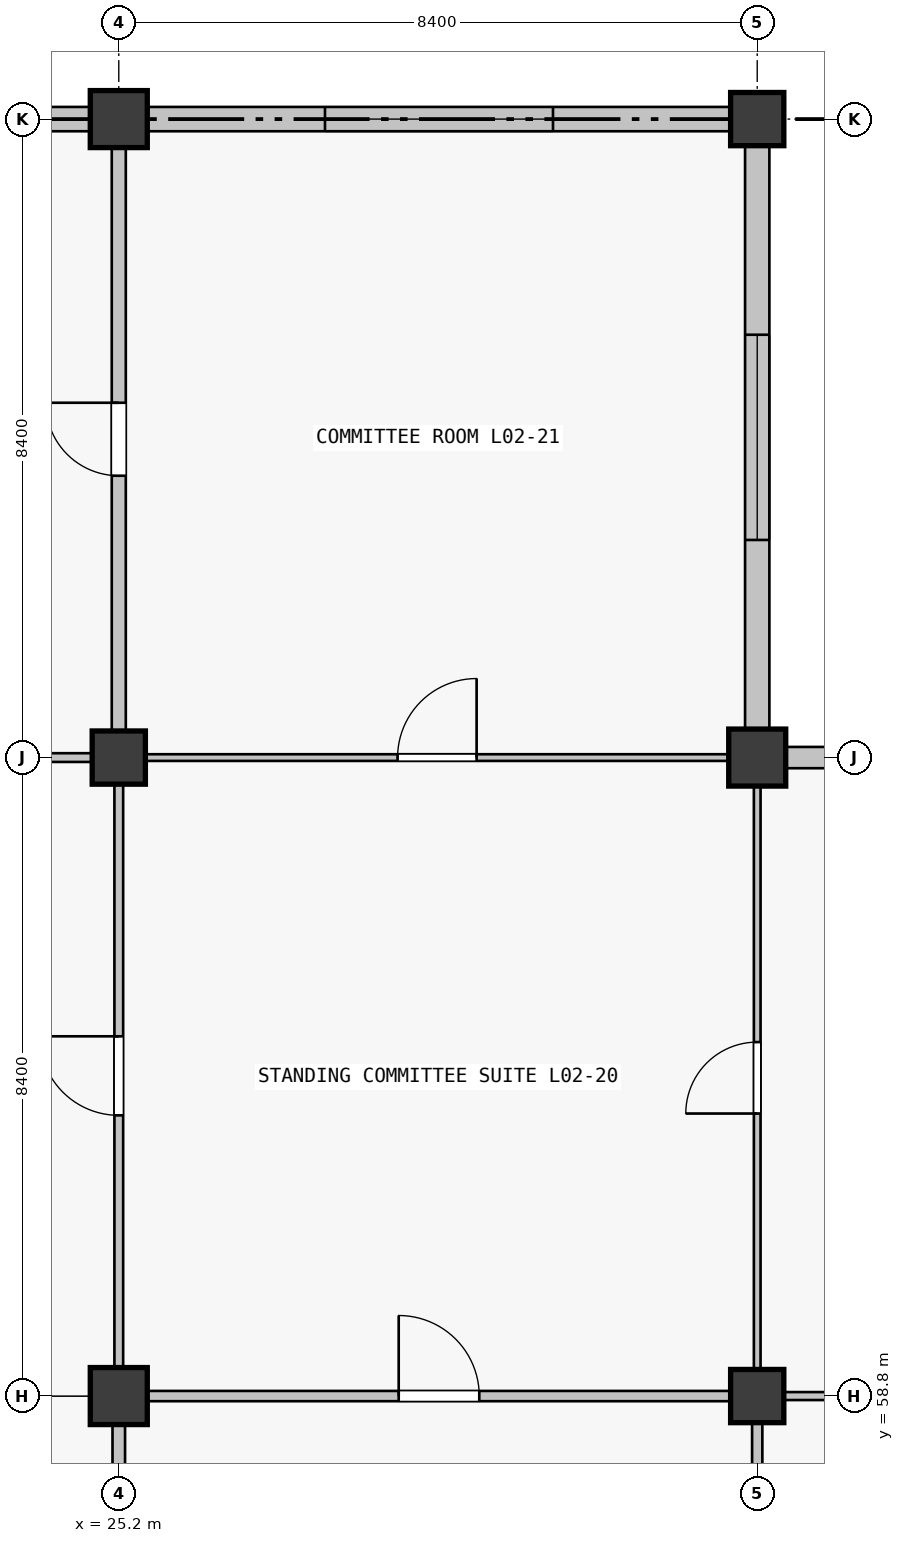
"""IFC4 building model, lengths in metres.
Left out: names, types, materials, properties, quantities, classifications, styles, units other than length and angle.
Written with IfcOpenShell. Run it as: python <this file> out.ifc"""

import sys

from ifc_helpers import new_model, si_unit, direction, frame, frame_2d, origin, origin_2d, place, context, subcontext, project, spatial, rectangle, extrude, element, fill, save


model = new_model("IFC4")
c1 = context("Model", 3, precision=1e-05, world=origin(), true_north=direction((0.0, 1.0)))
c2 = subcontext(c1, "Body", "Model", "MODEL_VIEW")
j1 = project(units=[si_unit("LENGTHUNIT", "METRE"), si_unit("PLANEANGLEUNIT", "RADIAN")], contexts=[c1])
p1 = place(None, origin())
s1 = spatial("IfcSite", under=j1, at=p1, CompositionType="ELEMENT")
p2 = place(p1, origin())
s2 = spatial("IfcBuilding", under=s1, at=p2, CompositionType="ELEMENT")
p3 = place(p2, frame((0.0, 0.0, 10.26)))
s3 = spatial("IfcBuildingStorey", under=s2, at=p3, CompositionType="ELEMENT", Elevation=10.26)
p4 = place(p3, frame((25.2, 58.8, 0.0), z_axis=(0.0, 0.0, 1.0), x_axis=(1.0, 0.0, 0.0)))
e1 = element("IfcColumn", 1, at=p4, inside=s3, PredefinedType="COLUMN", context=c2, shape_type="SweptSolid", body=[
    extrude(rectangle(XDim=0.75, YDim=0.75, at=origin_2d()), origin(), (0.0, 0.0, 1.0), 4.5),
])
p5 = place(p3, frame((25.2, 67.2, 0.0), z_axis=(0.0, 0.0, 1.0), x_axis=(1.0, 0.0, 0.0)))
e2 = element("IfcColumn", 2, at=p5, inside=s3, PredefinedType="COLUMN", context=c2, shape_type="SweptSolid", body=[
    extrude(rectangle(XDim=0.7, YDim=0.7, at=origin_2d()), origin(), (0.0, 0.0, 1.0), 4.5),
])
p6 = place(p3, frame((25.2, 75.6, 0.0), z_axis=(0.0, 0.0, 1.0), x_axis=(1.0, 0.0, 0.0)))
e3 = element("IfcColumn", 3, at=p6, inside=s3, PredefinedType="COLUMN", context=c2, shape_type="SweptSolid", body=[
    extrude(rectangle(XDim=0.75, YDim=0.75, at=origin_2d()), origin(), (0.0, 0.0, 1.0), 4.5),
])
p7 = place(p3, frame((33.6, 58.8, 0.0), z_axis=(0.0, 0.0, 1.0), x_axis=(1.0, 0.0, 0.0)))
e4 = element("IfcColumn", 4, at=p7, inside=s3, PredefinedType="COLUMN", context=c2, shape_type="SweptSolid", body=[
    extrude(rectangle(XDim=0.7, YDim=0.7, at=origin_2d()), origin(), (0.0, 0.0, 1.0), 4.5),
])
p8 = place(p3, frame((33.6, 67.2, 0.0), z_axis=(0.0, 0.0, 1.0), x_axis=(1.0, 0.0, 0.0)))
e5 = element("IfcColumn", 5, at=p8, inside=s3, PredefinedType="COLUMN", context=c2, shape_type="SweptSolid", body=[
    extrude(rectangle(XDim=0.75, YDim=0.75, at=origin_2d()), origin(), (0.0, 0.0, 1.0), 4.5),
])
p9 = place(p3, frame((33.6, 75.6, 0.0), z_axis=(0.0, 0.0, 1.0), x_axis=(1.0, 0.0, 0.0)))
e6 = element("IfcColumn", 6, at=p9, inside=s3, PredefinedType="COLUMN", context=c2, shape_type="SweptSolid", body=[
    extrude(rectangle(XDim=0.7, YDim=0.7, at=origin_2d()), origin(), (0.0, 0.0, 1.0), 4.5),
])
p10 = place(p3, frame((17.151, 75.6, 0.0), z_axis=(0.0, 0.0, 1.0), x_axis=(1.0, 0.0, 0.0)))
e7 = element("IfcWall", 7, at=p10, inside=s3, PredefinedType="SOLIDWALL", context=c2, shape_type="SweptSolid", body=[
    extrude(rectangle(XDim=7.673, YDim=0.32, at=frame_2d((3.836, 0.0))), origin(), (0.0, 0.0, 1.0), 3.54),
])
p11 = place(p10, frame((2.636, 0.0, 0.9)))
e8 = element("IfcOpeningElement", 8, at=p11, cuts=e7, PredefinedType="OPENING", context=c2, shape_type="SweptSolid", body=[
    extrude(rectangle(XDim=2.4, YDim=1.8, at=frame_2d((1.2, 0.9))), frame((0.0, 0.16, 0.0), z_axis=(0.0, -1.0, 0.0), x_axis=(1.0, 0.0, 0.0)), (0.0, 0.0, 1.0), 0.32),
])
p12 = place(p3, frame((25.576, 75.6, 0.0), z_axis=(0.0, 0.0, 1.0), x_axis=(1.0, 0.0, 0.0)))
e9 = element("IfcWall", 9, at=p12, inside=s3, PredefinedType="SOLIDWALL", context=c2, shape_type="SweptSolid", body=[
    extrude(rectangle(XDim=7.673, YDim=0.32, at=frame_2d((3.836, 0.0))), origin(), (0.0, 0.0, 1.0), 3.54),
])
p13 = place(p12, frame((2.337, 0.0, 0.9)))
e10 = element("IfcOpeningElement", 10, at=p13, cuts=e9, PredefinedType="OPENING", context=c2, shape_type="SweptSolid", body=[
    extrude(rectangle(XDim=3.0, YDim=1.2, at=frame_2d((1.5, 0.6))), frame((0.0, 0.16, 0.0), z_axis=(0.0, -1.0, 0.0), x_axis=(1.0, 0.0, 0.0)), (0.0, 0.0, 1.0), 0.32),
])
p14 = place(p3, frame((33.6, 75.249, 0.0), z_axis=(0.0, 0.0, 1.0), x_axis=(0.0, -1.0, 0.0)))
e11 = element("IfcWall", 11, at=p14, inside=s3, PredefinedType="SOLIDWALL", context=c2, shape_type="SweptSolid", body=[
    extrude(rectangle(XDim=7.673, YDim=0.32, at=frame_2d((3.836, 0.0))), origin(), (0.0, 0.0, 1.0), 3.54),
])
p15 = place(p14, frame((2.486, 0.0, 0.9)))
e12 = element("IfcOpeningElement", 12, at=p15, cuts=e11, PredefinedType="OPENING", context=c2, shape_type="SweptSolid", body=[
    extrude(rectangle(XDim=2.7, YDim=1.2, at=frame_2d((1.35, 0.6))), frame((0.0, 0.16, 0.0), z_axis=(0.0, -1.0, 0.0), x_axis=(1.0, 0.0, 0.0)), (0.0, 0.0, 1.0), 0.32),
])
p16 = place(p3, frame((33.976, 67.2, 0.0), z_axis=(0.0, 0.0, 1.0), x_axis=(1.0, 0.0, 0.0)))
e13 = element("IfcWall", 13, at=p16, inside=s3, PredefinedType="SOLIDWALL", context=c2, shape_type="SweptSolid", body=[
    extrude(rectangle(XDim=7.673, YDim=0.28, at=frame_2d((3.836, 0.0))), origin(), (0.0, 0.0, 1.0), 3.54),
])
p17 = place(p16, frame((2.937, 0.0, 0.9)))
e14 = element("IfcOpeningElement", 14, at=p17, cuts=e13, PredefinedType="OPENING", context=c2, shape_type="SweptSolid", body=[
    extrude(rectangle(XDim=1.8, YDim=1.35, at=frame_2d((0.9, 0.675))), frame((0.0, 0.14, 0.0), z_axis=(0.0, -1.0, 0.0), x_axis=(1.0, 0.0, 0.0)), (0.0, 0.0, 1.0), 0.28),
])
p18 = place(p3, frame((17.177, 67.2, 0.0), z_axis=(0.0, 0.0, 1.0), x_axis=(1.0, 0.0, 0.0)))
e15 = element("IfcWall", 15, at=p18, inside=s3, PredefinedType="PARTITIONING", context=c2, shape_type="SweptSolid", body=[
    extrude(rectangle(XDim=7.671, YDim=0.115, at=frame_2d((3.835, 0.0))), origin(), (0.0, 0.0, 1.0), 3.37),
])
p19 = place(p18, frame((3.316, 0.0, 0.0)))
e16 = element("IfcOpeningElement", 16, at=p19, cuts=e15, PredefinedType="OPENING", context=c2, shape_type="SweptSolid", body=[
    extrude(rectangle(XDim=1.04, YDim=2.2, at=frame_2d((0.52, 1.1))), frame((0.0, 0.058, 0.0), z_axis=(0.0, -1.0, 0.0), x_axis=(1.0, 0.0, 0.0)), (0.0, 0.0, 1.0), 0.115),
])
p20 = place(p3, frame((25.577, 58.8, 0.0), z_axis=(0.0, 0.0, 1.0), x_axis=(1.0, 0.0, 0.0)))
e17 = element("IfcWall", 17, at=p20, inside=s3, PredefinedType="PARTITIONING", context=c2, shape_type="SweptSolid", body=[
    extrude(rectangle(XDim=7.671, YDim=0.135, at=frame_2d((3.835, 0.0))), origin(), (0.0, 0.0, 1.0), 3.37),
])
p21 = place(p20, frame((3.306, 0.0, 0.0)))
e18 = element("IfcOpeningElement", 18, at=p21, cuts=e17, PredefinedType="OPENING", context=c2, shape_type="SweptSolid", body=[
    extrude(rectangle(XDim=1.06, YDim=2.25, at=frame_2d((0.53, 1.125))), frame((0.0, 0.067, 0.0), z_axis=(0.0, -1.0, 0.0), x_axis=(1.0, 0.0, 0.0)), (0.0, 0.0, 1.0), 0.135),
])
p22 = place(p3, frame((25.552, 67.2, 0.0), z_axis=(0.0, 0.0, 1.0), x_axis=(1.0, 0.0, 0.0)))
e19 = element("IfcWall", 19, at=p22, inside=s3, PredefinedType="PARTITIONING", context=c2, shape_type="SweptSolid", body=[
    extrude(rectangle(XDim=7.671, YDim=0.088, at=frame_2d((3.835, 0.0))), origin(), (0.0, 0.0, 1.0), 3.37),
])
p23 = place(p22, frame((3.316, 0.0, 0.0)))
e20 = element("IfcOpeningElement", 20, at=p23, cuts=e19, PredefinedType="OPENING", context=c2, shape_type="SweptSolid", body=[
    extrude(rectangle(XDim=1.04, YDim=2.2, at=frame_2d((0.52, 1.1))), frame((0.0, 0.044, 0.0), z_axis=(0.0, -1.0, 0.0), x_axis=(1.0, 0.0, 0.0)), (0.0, 0.0, 1.0), 0.088),
])
p24 = place(p3, frame((33.952, 58.8, 0.0), z_axis=(0.0, 0.0, 1.0), x_axis=(1.0, 0.0, 0.0)))
e21 = element("IfcWall", 21, at=p24, inside=s3, PredefinedType="PARTITIONING", context=c2, shape_type="SweptSolid", body=[
    extrude(rectangle(XDim=7.721, YDim=0.105, at=frame_2d((3.861, 0.0))), origin(), (0.0, 0.0, 1.0), 3.37),
])
p25 = place(p24, frame((3.351, 0.0, 0.0)))
e22 = element("IfcOpeningElement", 22, at=p25, cuts=e21, PredefinedType="OPENING", context=c2, shape_type="SweptSolid", body=[
    extrude(rectangle(XDim=1.02, YDim=2.2, at=frame_2d((0.51, 1.1))), frame((0.0, 0.052, 0.0), z_axis=(0.0, -1.0, 0.0), x_axis=(1.0, 0.0, 0.0)), (0.0, 0.0, 1.0), 0.105),
])
p26 = place(p3, frame((25.2, 50.752, 0.0), z_axis=(0.0, 0.0, 1.0), x_axis=(0.0, 1.0, 0.0)))
e23 = element("IfcWall", 23, at=p26, inside=s3, PredefinedType="PARTITIONING", context=c2, shape_type="SweptSolid", body=[
    extrude(rectangle(XDim=7.671, YDim=0.165, at=frame_2d((3.835, 0.0))), origin(), (0.0, 0.0, 1.0), 3.37),
])
p27 = place(p26, frame((3.306, 0.0, 0.0)))
e24 = element("IfcOpeningElement", 24, at=p27, cuts=e23, PredefinedType="OPENING", context=c2, shape_type="SweptSolid", body=[
    extrude(rectangle(XDim=1.06, YDim=2.25, at=frame_2d((0.53, 1.125))), frame((0.0, 0.083, 0.0), z_axis=(0.0, -1.0, 0.0), x_axis=(1.0, 0.0, 0.0)), (0.0, 0.0, 1.0), 0.165),
])
p28 = place(p3, frame((25.2, 59.177, 0.0), z_axis=(0.0, 0.0, 1.0), x_axis=(0.0, 1.0, 0.0)))
e25 = element("IfcWall", 25, at=p28, inside=s3, PredefinedType="PARTITIONING", context=c2, shape_type="SweptSolid", body=[
    extrude(rectangle(XDim=7.671, YDim=0.115, at=frame_2d((3.835, 0.0))), origin(), (0.0, 0.0, 1.0), 3.37),
])
p29 = place(p28, frame((3.316, 0.0, 0.0)))
e26 = element("IfcOpeningElement", 26, at=p29, cuts=e25, PredefinedType="OPENING", context=c2, shape_type="SweptSolid", body=[
    extrude(rectangle(XDim=1.04, YDim=2.2, at=frame_2d((0.52, 1.1))), frame((0.0, 0.058, 0.0), z_axis=(0.0, -1.0, 0.0), x_axis=(1.0, 0.0, 0.0)), (0.0, 0.0, 1.0), 0.115),
])
p30 = place(p3, frame((25.2, 67.552, 0.0), z_axis=(0.0, 0.0, 1.0), x_axis=(0.0, 1.0, 0.0)))
e27 = element("IfcWall", 27, at=p30, inside=s3, PredefinedType="PARTITIONING", context=c2, shape_type="SweptSolid", body=[
    extrude(rectangle(XDim=7.671, YDim=0.185, at=frame_2d((3.835, 0.0))), origin(), (0.0, 0.0, 1.0), 3.37),
])
p31 = place(p30, frame((3.356, 0.0, 0.0)))
e28 = element("IfcOpeningElement", 28, at=p31, cuts=e27, PredefinedType="OPENING", context=c2, shape_type="SweptSolid", body=[
    extrude(rectangle(XDim=0.96, YDim=2.18, at=frame_2d((0.48, 1.09))), frame((0.0, 0.093, 0.0), z_axis=(0.0, -1.0, 0.0), x_axis=(1.0, 0.0, 0.0)), (0.0, 0.0, 1.0), 0.185),
])
p32 = place(p3, frame((33.6, 50.777, 0.0), z_axis=(0.0, 0.0, 1.0), x_axis=(0.0, 1.0, 0.0)))
e29 = element("IfcWall", 29, at=p32, inside=s3, PredefinedType="PARTITIONING", context=c2, shape_type="SweptSolid", body=[
    extrude(rectangle(XDim=7.671, YDim=0.135, at=frame_2d((3.835, 0.0))), origin(), (0.0, 0.0, 1.0), 3.37),
])
p33 = place(p32, frame((3.336, 0.0, 0.0)))
e30 = element("IfcOpeningElement", 30, at=p33, cuts=e29, PredefinedType="OPENING", context=c2, shape_type="SweptSolid", body=[
    extrude(rectangle(XDim=1.0, YDim=2.2, at=frame_2d((0.5, 1.1))), frame((0.0, 0.067, 0.0), z_axis=(0.0, -1.0, 0.0), x_axis=(1.0, 0.0, 0.0)), (0.0, 0.0, 1.0), 0.135),
])
p34 = place(p3, frame((33.6, 59.152, 0.0), z_axis=(0.0, 0.0, 1.0), x_axis=(0.0, 1.0, 0.0)))
e31 = element("IfcWall", 31, at=p34, inside=s3, PredefinedType="PARTITIONING", context=c2, shape_type="SweptSolid", body=[
    extrude(rectangle(XDim=7.671, YDim=0.088, at=frame_2d((3.835, 0.0))), origin(), (0.0, 0.0, 1.0), 3.37),
])
p35 = place(p34, frame((3.365, 0.0, 0.0)))
e32 = element("IfcOpeningElement", 32, at=p35, cuts=e31, PredefinedType="OPENING", context=c2, shape_type="SweptSolid", body=[
    extrude(rectangle(XDim=0.94, YDim=2.15, at=frame_2d((0.47, 1.075))), frame((0.0, 0.044, 0.0), z_axis=(0.0, -1.0, 0.0), x_axis=(1.0, 0.0, 0.0)), (0.0, 0.0, 1.0), 0.088),
])
p36 = place(p13, origin())
e33 = element("IfcWindow", 33, at=p36, inside=s3, PartitioningType="SINGLE_PANEL", PredefinedType="WINDOW", context=c2, shape_type="SweptSolid", body=[
    extrude(rectangle(XDim=3.0, YDim=1.2, at=frame_2d((1.5, 0.6))), frame((0.0, 0.03, 0.0), z_axis=(0.0, -1.0, 0.0), x_axis=(1.0, 0.0, 0.0)), (0.0, 0.0, 1.0), 0.06),
])
fill(e10, e33)
p37 = place(p15, origin())
e34 = element("IfcWindow", 34, at=p37, inside=s3, PartitioningType="SINGLE_PANEL", PredefinedType="WINDOW", context=c2, shape_type="SweptSolid", body=[
    extrude(rectangle(XDim=2.7, YDim=1.2, at=frame_2d((1.35, 0.6))), frame((0.0, 0.03, 0.0), z_axis=(0.0, -1.0, 0.0), x_axis=(1.0, 0.0, 0.0)), (0.0, 0.0, 1.0), 0.06),
])
fill(e12, e34)
p38 = place(p29, origin())
e35 = element("IfcDoor", 35, at=p38, inside=s3, OperationType="SINGLE_SWING_RIGHT", PredefinedType="DOOR", context=c2, shape_type="SweptSolid", body=[
    extrude(rectangle(XDim=1.04, YDim=2.2, at=frame_2d((0.52, 1.1))), frame((0.0, 0.025, 0.0), z_axis=(0.0, -1.0, 0.0), x_axis=(1.0, 0.0, 0.0)), (0.0, 0.0, 1.0), 0.05),
])
fill(e26, e35)
p39 = place(p23, origin())
e36 = element("IfcDoor", 36, at=p39, inside=s3, OperationType="SINGLE_SWING_RIGHT", PredefinedType="DOOR", context=c2, shape_type="SweptSolid", body=[
    extrude(rectangle(XDim=1.04, YDim=2.2, at=frame_2d((0.52, 1.1))), frame((0.0, 0.025, 0.0), z_axis=(0.0, -1.0, 0.0), x_axis=(1.0, 0.0, 0.0)), (0.0, 0.0, 1.0), 0.05),
])
fill(e20, e36)
p40 = place(p21, origin())
e37 = element("IfcDoor", 37, at=p40, inside=s3, OperationType="SINGLE_SWING_LEFT", PredefinedType="DOOR", context=c2, shape_type="SweptSolid", body=[
    extrude(rectangle(XDim=1.06, YDim=2.25, at=frame_2d((0.53, 1.125))), frame((0.0, 0.025, 0.0), z_axis=(0.0, -1.0, 0.0), x_axis=(1.0, 0.0, 0.0)), (0.0, 0.0, 1.0), 0.05),
])
fill(e18, e37)
p41 = place(p31, origin())
e38 = element("IfcDoor", 38, at=p41, inside=s3, OperationType="SINGLE_SWING_RIGHT", PredefinedType="DOOR", context=c2, shape_type="SweptSolid", body=[
    extrude(rectangle(XDim=0.96, YDim=2.18, at=frame_2d((0.48, 1.09))), frame((0.0, 0.025, 0.0), z_axis=(0.0, -1.0, 0.0), x_axis=(1.0, 0.0, 0.0)), (0.0, 0.0, 1.0), 0.05),
])
fill(e28, e38)
p42 = place(p35, origin())
e39 = element("IfcDoor", 39, at=p42, inside=s3, OperationType="SINGLE_SWING_LEFT", PredefinedType="DOOR", context=c2, shape_type="SweptSolid", body=[
    extrude(rectangle(XDim=0.94, YDim=2.15, at=frame_2d((0.47, 1.075))), frame((0.0, 0.025, 0.0), z_axis=(0.0, -1.0, 0.0), x_axis=(1.0, 0.0, 0.0)), (0.0, 0.0, 1.0), 0.05),
])
fill(e32, e39)
save(model, sys.argv[1])
